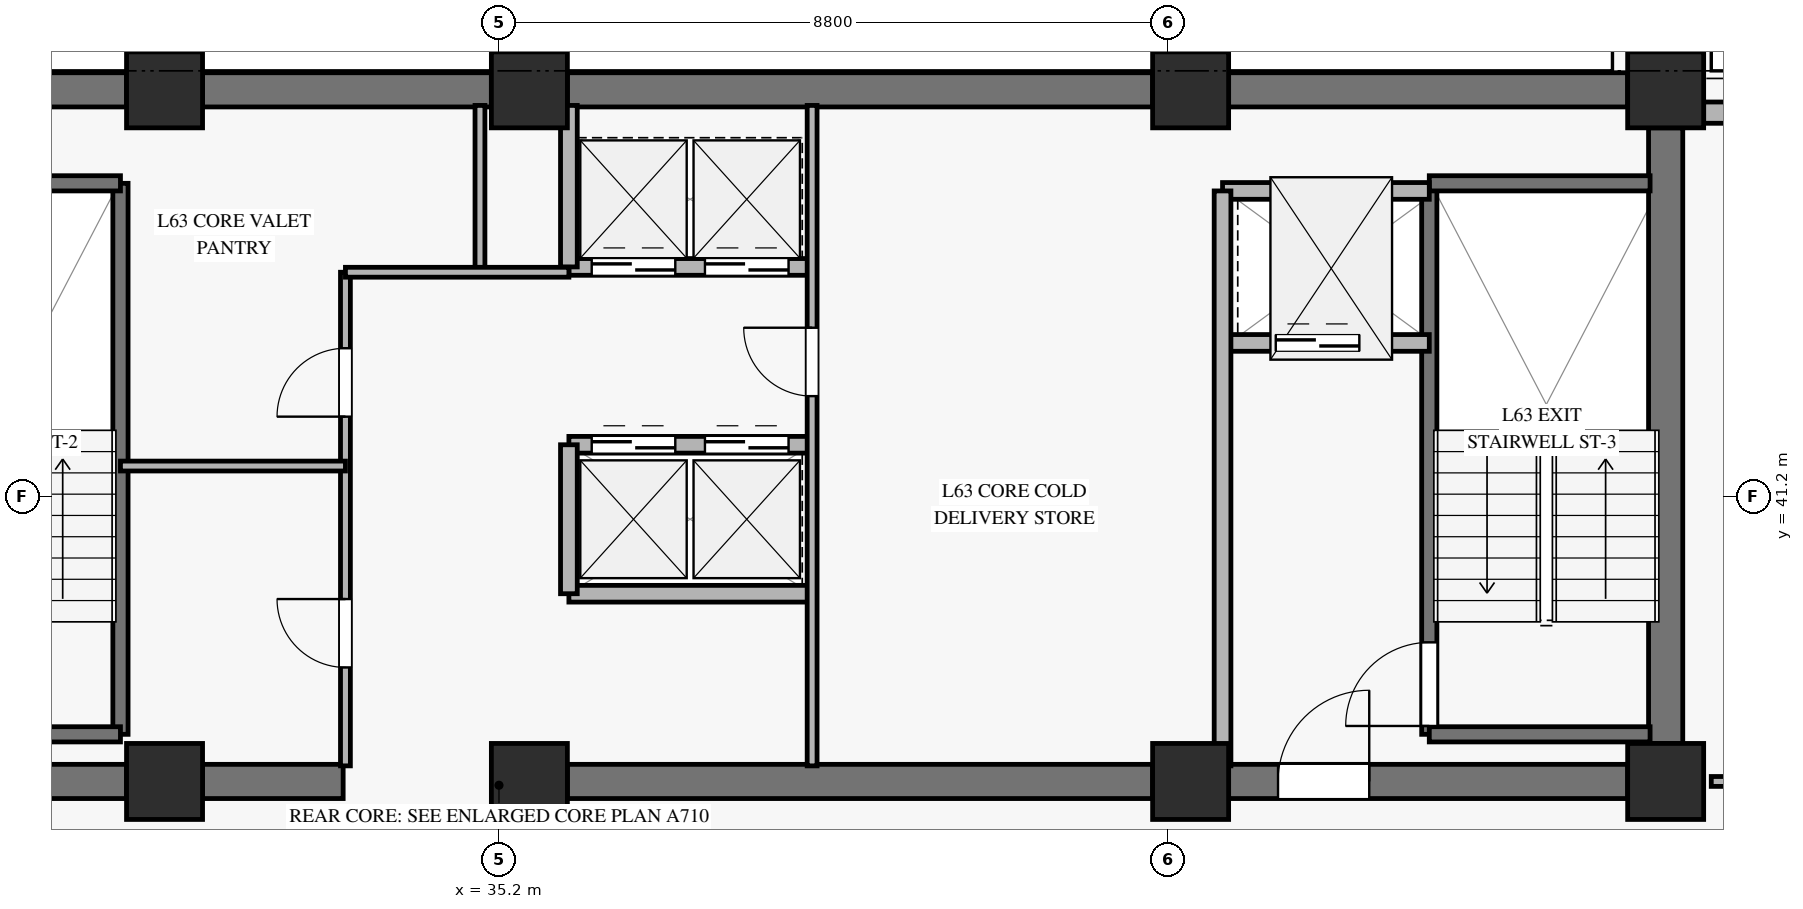
"""IFC4 building model, lengths in metres.
Left out: names, types, materials, properties, quantities, classifications, styles, units other than length and angle.
Written with IfcOpenShell. Run it as: python <this file> out.ifc"""

import sys

from ifc_helpers import new_model, si_unit, direction, frame, frame_2d, origin, origin_2d, place, context, subcontext, project, spatial, rectangle, extrude, source, transform, mapped, element, fill, save


model = new_model("IFC4")
c1 = context("Model", 3, precision=1e-05, world=origin(), true_north=direction((0.0, 1.0)))
c2 = subcontext(c1, "Body", "Model", "MODEL_VIEW")
j1 = project(units=[si_unit("LENGTHUNIT", "METRE"), si_unit("PLANEANGLEUNIT", "RADIAN")], contexts=[c1])
p1 = place(None, origin())
s1 = spatial("IfcSite", under=j1, at=p1, CompositionType="ELEMENT")
p2 = place(p1, origin())
s2 = spatial("IfcBuilding", under=s1, at=p2, CompositionType="ELEMENT")
p3 = place(p2, frame((0.0, 0.0, 248.5)))
s3 = spatial("IfcBuildingStorey", under=s2, at=p3, CompositionType="ELEMENT", Elevation=248.5)
m1 = source(origin(), c2, "Body", "SweptSolid", [
    extrude(rectangle(XDim=1.0, YDim=1.0, at=origin_2d()), origin(), (0.0, 0.0, 1.0), 3.185),
])
for number, where, z_axis, x_axis in (
    (1, (30.8, 37.45, 0.0), (0.0, 0.0, 1.0), (1.0, 0.0, 0.0)),
    (2, (30.8, 46.55, 0.0), (0.0, 0.0, 1.0), (1.0, 0.0, 0.0)),
    (3, (35.6, 37.45, 0.0), (0.0, 0.0, 1.0), (1.0, 0.0, 0.0)),
    (4, (35.6, 46.55, 0.0), (0.0, 0.0, 1.0), (1.0, 0.0, 0.0)),
    (5, (44.3, 37.45, 0.0), (0.0, 0.0, 1.0), (1.0, 0.0, 0.0)),
    (6, (44.3, 46.55, 0.0), (0.0, 0.0, 1.0), (1.0, 0.0, 0.0)),
    (7, (50.55, 37.45, 0.0), (0.0, 0.0, 1.0), (1.0, 0.0, 0.0)),
    (8, (50.55, 46.55, 0.0), (0.0, 0.0, 1.0), (1.0, 0.0, 0.0)),
):
    element("IfcColumn", number, at=place(p3, frame(where, z_axis=z_axis, x_axis=x_axis)), inside=s3, PredefinedType="PILASTER", context=c2, shape_type="MappedRepresentation", body=[
        mapped(m1, transform((0.0, 0.0, 0.0), x_axis=(1.0, 0.0, 0.0), y_axis=(0.0, 1.0, 0.0), z_axis=(0.0, 0.0, 1.0), scale=1.0)),
    ])
p4 = place(p3, frame((20.35, 46.55, 0.0), z_axis=(0.0, 0.0, 1.0), x_axis=(1.0, 0.0, 0.0)))
e9 = element("IfcWall", 9, at=p4, inside=s3, PredefinedType="SHEAR", context=c2, shape_type="SweptSolid", body=[
    extrude(rectangle(XDim=9.95, YDim=0.45, at=frame_2d((4.975, 0.0))), origin(), (0.0, 0.0, 1.0), 3.185),
])
p5 = place(p3, frame((31.3, 46.55, 0.0), z_axis=(0.0, 0.0, 1.0), x_axis=(1.0, 0.0, 0.0)))
e10 = element("IfcWall", 10, at=p5, inside=s3, PredefinedType="SHEAR", context=c2, shape_type="SweptSolid", body=[
    extrude(rectangle(XDim=3.8, YDim=0.45, at=frame_2d((1.9, 0.0))), origin(), (0.0, 0.0, 1.0), 3.185),
])
p6 = place(p3, frame((36.1, 46.55, 0.0), z_axis=(0.0, 0.0, 1.0), x_axis=(1.0, 0.0, 0.0)))
e11 = element("IfcWall", 11, at=p6, inside=s3, PredefinedType="SHEAR", context=c2, shape_type="SweptSolid", body=[
    extrude(rectangle(XDim=7.7, YDim=0.45, at=frame_2d((3.85, 0.0))), origin(), (0.0, 0.0, 1.0), 3.185),
])
p7 = place(p3, frame((44.8, 46.55, 0.0), z_axis=(0.0, 0.0, 1.0), x_axis=(1.0, 0.0, 0.0)))
e12 = element("IfcWall", 12, at=p7, inside=s3, PredefinedType="SHEAR", context=c2, shape_type="SweptSolid", body=[
    extrude(rectangle(XDim=5.25, YDim=0.45, at=frame_2d((2.625, 0.0))), origin(), (0.0, 0.0, 1.0), 3.185),
])
p8 = place(p3, frame((20.35, 37.45, 0.0), z_axis=(0.0, 0.0, 1.0), x_axis=(1.0, 0.0, 0.0)))
e13 = element("IfcWall", 13, at=p8, inside=s3, PredefinedType="SHEAR", context=c2, shape_type="SweptSolid", body=[
    extrude(rectangle(XDim=9.95, YDim=0.45, at=frame_2d((4.975, 0.0))), origin(), (0.0, 0.0, 1.0), 3.185),
])
p9 = place(p8, frame((4.2, 0.0, 0.0)))
e14 = element("IfcOpeningElement", 14, at=p9, cuts=e13, PredefinedType="OPENING", context=c2, shape_type="SweptSolid", body=[
    extrude(rectangle(XDim=1.2, YDim=2.15, at=frame_2d((0.6, 1.075))), frame((0.0, 0.235, 0.0), z_axis=(0.0, -1.0, 0.0), x_axis=(1.0, 0.0, 0.0)), (0.0, 0.0, 1.0), 0.47),
])
p10 = place(p3, frame((31.3, 37.45, 0.0), z_axis=(0.0, 0.0, 1.0), x_axis=(1.0, 0.0, 0.0)))
e15 = element("IfcWall", 15, at=p10, inside=s3, PredefinedType="SHEAR", context=c2, shape_type="SweptSolid", body=[
    extrude(rectangle(XDim=1.85, YDim=0.45, at=frame_2d((0.925, 0.0))), origin(), (0.0, 0.0, 1.0), 3.185),
])
p11 = place(p3, frame((36.1, 37.45, 0.0), z_axis=(0.0, 0.0, 1.0), x_axis=(1.0, 0.0, 0.0)))
e16 = element("IfcWall", 16, at=p11, inside=s3, PredefinedType="SHEAR", context=c2, shape_type="SweptSolid", body=[
    extrude(rectangle(XDim=7.7, YDim=0.45, at=frame_2d((3.85, 0.0))), origin(), (0.0, 0.0, 1.0), 3.185),
])
p12 = place(p3, frame((44.8, 37.45, 0.0), z_axis=(0.0, 0.0, 1.0), x_axis=(1.0, 0.0, 0.0)))
e17 = element("IfcWall", 17, at=p12, inside=s3, PredefinedType="SHEAR", context=c2, shape_type="SweptSolid", body=[
    extrude(rectangle(XDim=5.25, YDim=0.45, at=frame_2d((2.625, 0.0))), origin(), (0.0, 0.0, 1.0), 3.185),
])
p13 = place(p12, frame((0.65, 0.0, 0.0)))
e18 = element("IfcOpeningElement", 18, at=p13, cuts=e17, PredefinedType="OPENING", context=c2, shape_type="SweptSolid", body=[
    extrude(rectangle(XDim=1.2, YDim=2.15, at=frame_2d((0.6, 1.075))), frame((0.0, 0.235, 0.0), z_axis=(0.0, -1.0, 0.0), x_axis=(1.0, 0.0, 0.0)), (0.0, 0.0, 1.0), 0.47),
])
p14 = place(p3, frame((50.55, 37.95, 0.0), z_axis=(0.0, 0.0, 1.0), x_axis=(0.0, 1.0, 0.0)))
e19 = element("IfcWall", 19, at=p14, inside=s3, PredefinedType="SHEAR", context=c2, shape_type="SweptSolid", body=[
    extrude(rectangle(XDim=8.1, YDim=0.45, at=frame_2d((4.05, 0.0))), origin(), (0.0, 0.0, 1.0), 3.185),
])
p15 = place(p3, frame((51.05, 46.25, 0.0), z_axis=(0.0, 0.0, 1.0), x_axis=(1.0, 0.0, 0.0)))
e20 = element("IfcWall", 20, at=p15, inside=s3, PredefinedType="SOLIDWALL", context=c2, shape_type="SweptSolid", body=[
    extrude(rectangle(XDim=8.122, YDim=0.28, at=frame_2d((4.061, 0.0))), origin(), (0.0, 0.0, 1.0), 2.815),
])
p16 = place(p15, frame((3.261, 0.0, 0.45)))
e21 = element("IfcOpeningElement", 21, at=p16, cuts=e20, PredefinedType="OPENING", context=c2, shape_type="SweptSolid", body=[
    extrude(rectangle(XDim=1.6, YDim=2.0, at=frame_2d((0.8, 1.0))), frame((0.0, 0.15, 0.0), z_axis=(0.0, -1.0, 0.0), x_axis=(1.0, 0.0, 0.0)), (0.0, 0.0, 1.0), 0.3),
])
p17 = place(p3, frame((30.22, 38.07, 0.0), z_axis=(0.0, 0.0, 1.0), x_axis=(0.0, 1.0, 0.0)))
e22 = element("IfcWall", 22, at=p17, inside=s3, PredefinedType="SOLIDWALL", context=c2, shape_type="SweptSolid", body=[
    extrude(rectangle(XDim=7.25, YDim=0.2, at=frame_2d((3.625, 0.0))), origin(), (0.0, 0.0, 1.0), 3.4),
])
for number, where, z_axis, x_axis in (
    (23, (27.14, 45.32, 0.0), (0.0, 0.0, 1.0), (1.0, 0.0, 0.0)),
    (24, (27.14, 38.07, 0.0), (0.0, 0.0, 1.0), (1.0, 0.0, 0.0)),
):
    element("IfcWall", number, at=place(p3, frame(where, z_axis=z_axis, x_axis=x_axis)), inside=s3, PredefinedType="SOLIDWALL", context=c2, shape_type="SweptSolid", body=[
        extrude(rectangle(XDim=3.08, YDim=0.2, at=frame_2d((1.54, 0.0))), origin(), (0.0, 0.0, 1.0), 3.4),
    ])
p18 = place(p3, frame((47.44, 38.07, 0.0), z_axis=(0.0, 0.0, 1.0), x_axis=(0.0, 1.0, 0.0)))
e25 = element("IfcWall", 25, at=p18, inside=s3, PredefinedType="SOLIDWALL", context=c2, shape_type="SweptSolid", body=[
    extrude(rectangle(XDim=7.25, YDim=0.2, at=frame_2d((3.625, 0.0))), origin(), (0.0, 0.0, 1.0), 3.4),
])
p19 = place(p18, frame((0.11, 0.0, 0.0)))
e26 = element("IfcOpeningElement", 26, at=p19, cuts=e25, PredefinedType="OPENING", context=c2, shape_type="SweptSolid", body=[
    extrude(rectangle(XDim=1.1, YDim=2.15, at=frame_2d((0.55, 1.075))), frame((0.0, 0.11, 0.0), z_axis=(0.0, -1.0, 0.0), x_axis=(1.0, 0.0, 0.0)), (0.0, 0.0, 1.0), 0.22),
])
for number, where, z_axis, x_axis in (
    (27, (47.44, 45.32, 0.0), (0.0, 0.0, 1.0), (1.0, 0.0, 0.0)),
    (28, (47.44, 38.07, 0.0), (0.0, 0.0, 1.0), (1.0, 0.0, 0.0)),
):
    element("IfcWall", number, at=place(p3, frame(where, z_axis=z_axis, x_axis=x_axis)), inside=s3, PredefinedType="SOLIDWALL", context=c2, shape_type="SweptSolid", body=[
        extrude(rectangle(XDim=2.905, YDim=0.2, at=frame_2d((1.453, 0.0))), origin(), (0.0, 0.0, 1.0), 3.4),
    ])
p20 = place(p3, frame((44.72, 43.22, 0.0), z_axis=(0.0, 0.0, 1.0), x_axis=(1.0, 0.0, 0.0)))
e29 = element("IfcWall", 29, at=p20, inside=s3, PredefinedType="SOLIDWALL", context=c2, shape_type="SweptSolid", body=[
    extrude(rectangle(XDim=2.72, YDim=0.22, at=frame_2d((1.36, 0.0))), origin(), (0.0, 0.0, 1.0), 3.185),
])
p21 = place(p20, frame((0.7, 0.0, 0.0)))
e30 = element("IfcOpeningElement", 30, at=p21, cuts=e29, PredefinedType="OPENING", context=c2, shape_type="SweptSolid", body=[
    extrude(rectangle(XDim=1.1, YDim=2.2, at=frame_2d((0.55, 1.1))), frame((0.0, 0.12, 0.0), z_axis=(0.0, -1.0, 0.0), x_axis=(1.0, 0.0, 0.0)), (0.0, 0.0, 1.0), 0.24),
])
p22 = place(p3, frame((44.72, 45.22, 0.0), z_axis=(0.0, 0.0, 1.0), x_axis=(1.0, 0.0, 0.0)))
e31 = element("IfcWall", 31, at=p22, inside=s3, PredefinedType="SOLIDWALL", context=c2, shape_type="SweptSolid", body=[
    extrude(rectangle(XDim=2.72, YDim=0.22, at=frame_2d((1.36, 0.0))), origin(), (0.0, 0.0, 1.0), 3.185),
])
p23 = place(p3, frame((44.72, 37.655, 0.0), z_axis=(0.0, 0.0, 1.0), x_axis=(0.0, 1.0, 0.0)))
e32 = element("IfcWall", 32, at=p23, inside=s3, PredefinedType="SOLIDWALL", context=c2, shape_type="SweptSolid", body=[
    extrude(rectangle(XDim=7.565, YDim=0.22, at=frame_2d((3.782, 0.0))), origin(), (0.0, 0.0, 1.0), 3.185),
])
p24 = place(p3, frame((36.12, 44.22, 0.0), z_axis=(0.0, 0.0, 1.0), x_axis=(1.0, 0.0, 0.0)))
e33 = element("IfcWall", 33, at=p24, inside=s3, PredefinedType="SOLIDWALL", context=c2, shape_type="SweptSolid", body=[
    extrude(rectangle(XDim=3.2, YDim=0.22, at=frame_2d((1.6, 0.0))), origin(), (0.0, 0.0, 1.0), 3.185),
])
p25 = place(p24, frame((0.3, 0.0, 0.0)))
e34 = element("IfcOpeningElement", 34, at=p25, cuts=e33, PredefinedType="OPENING", context=c2, shape_type="SweptSolid", body=[
    extrude(rectangle(XDim=1.1, YDim=2.2, at=frame_2d((0.55, 1.1))), frame((0.0, 0.12, 0.0), z_axis=(0.0, -1.0, 0.0), x_axis=(1.0, 0.0, 0.0)), (0.0, 0.0, 1.0), 0.24),
])
p26 = place(p24, frame((1.79, 0.0, 0.0)))
e35 = element("IfcOpeningElement", 35, at=p26, cuts=e33, PredefinedType="OPENING", context=c2, shape_type="SweptSolid", body=[
    extrude(rectangle(XDim=1.1, YDim=2.2, at=frame_2d((0.55, 1.1))), frame((0.0, 0.12, 0.0), z_axis=(0.0, -1.0, 0.0), x_axis=(1.0, 0.0, 0.0)), (0.0, 0.0, 1.0), 0.24),
])
p27 = place(p3, frame((36.12, 41.88, 0.0), z_axis=(0.0, 0.0, 1.0), x_axis=(1.0, 0.0, 0.0)))
e36 = element("IfcWall", 36, at=p27, inside=s3, PredefinedType="SOLIDWALL", context=c2, shape_type="SweptSolid", body=[
    extrude(rectangle(XDim=3.2, YDim=0.22, at=frame_2d((1.6, 0.0))), origin(), (0.0, 0.0, 1.0), 3.185),
])
p28 = place(p27, frame((0.3, 0.0, 0.0)))
e37 = element("IfcOpeningElement", 37, at=p28, cuts=e36, PredefinedType="OPENING", context=c2, shape_type="SweptSolid", body=[
    extrude(rectangle(XDim=1.1, YDim=2.2, at=frame_2d((0.55, 1.1))), frame((0.0, 0.12, 0.0), z_axis=(0.0, -1.0, 0.0), x_axis=(1.0, 0.0, 0.0)), (0.0, 0.0, 1.0), 0.24),
])
p29 = place(p27, frame((1.79, 0.0, 0.0)))
e38 = element("IfcOpeningElement", 38, at=p29, cuts=e36, PredefinedType="OPENING", context=c2, shape_type="SweptSolid", body=[
    extrude(rectangle(XDim=1.1, YDim=2.2, at=frame_2d((0.55, 1.1))), frame((0.0, 0.12, 0.0), z_axis=(0.0, -1.0, 0.0), x_axis=(1.0, 0.0, 0.0)), (0.0, 0.0, 1.0), 0.24),
])
p30 = place(p3, frame((36.12, 39.92, 0.0), z_axis=(0.0, 0.0, 1.0), x_axis=(1.0, 0.0, 0.0)))
e39 = element("IfcWall", 39, at=p30, inside=s3, PredefinedType="SOLIDWALL", context=c2, shape_type="SweptSolid", body=[
    extrude(rectangle(XDim=3.2, YDim=0.22, at=frame_2d((1.6, 0.0))), origin(), (0.0, 0.0, 1.0), 3.185),
])
p31 = place(p3, frame((36.12, 39.92, 0.0), z_axis=(0.0, 0.0, 1.0), x_axis=(0.0, 1.0, 0.0)))
e40 = element("IfcWall", 40, at=p31, inside=s3, PredefinedType="SOLIDWALL", context=c2, shape_type="SweptSolid", body=[
    extrude(rectangle(XDim=1.96, YDim=0.22, at=frame_2d((0.98, 0.0))), origin(), (0.0, 0.0, 1.0), 3.185),
])
p32 = place(p3, frame((36.12, 44.22, 0.0), z_axis=(0.0, 0.0, 1.0), x_axis=(0.0, 1.0, 0.0)))
e41 = element("IfcWall", 41, at=p32, inside=s3, PredefinedType="SOLIDWALL", context=c2, shape_type="SweptSolid", body=[
    extrude(rectangle(XDim=2.125, YDim=0.22, at=frame_2d((1.062, 0.0))), origin(), (0.0, 0.0, 1.0), 3.185),
])
p33 = place(p3, frame((33.18, 37.655, 0.0), z_axis=(0.0, 0.0, 1.0), x_axis=(0.0, 1.0, 0.0)))
e42 = element("IfcWall", 42, at=p33, inside=s3, PredefinedType="PARTITIONING", context=c2, shape_type="SweptSolid", body=[
    extrude(rectangle(XDim=6.495, YDim=0.13, at=frame_2d((3.248, 0.0))), origin(), (0.0, 0.0, 1.0), 2.27),
])
p34 = place(p33, frame((1.295, 0.0, 0.0)))
e43 = element("IfcOpeningElement", 43, at=p34, cuts=e42, PredefinedType="OPENING", context=c2, shape_type="SweptSolid", body=[
    extrude(rectangle(XDim=0.9, YDim=2.1, at=frame_2d((0.45, 1.05))), frame((0.0, 0.075, 0.0), z_axis=(0.0, -1.0, 0.0), x_axis=(1.0, 0.0, 0.0)), (0.0, 0.0, 1.0), 0.15),
])
p35 = place(p33, frame((4.595, 0.0, 0.0)))
e44 = element("IfcOpeningElement", 44, at=p35, cuts=e42, PredefinedType="OPENING", context=c2, shape_type="SweptSolid", body=[
    extrude(rectangle(XDim=0.9, YDim=2.1, at=frame_2d((0.45, 1.05))), frame((0.0, 0.075, 0.0), z_axis=(0.0, -1.0, 0.0), x_axis=(1.0, 0.0, 0.0)), (0.0, 0.0, 1.0), 0.15),
])
p36 = place(p3, frame((34.95, 44.15, 0.0), z_axis=(0.0, 0.0, 1.0), x_axis=(0.0, 1.0, 0.0)))
e45 = element("IfcWall", 45, at=p36, inside=s3, PredefinedType="PARTITIONING", context=c2, shape_type="SweptSolid", body=[
    extrude(rectangle(XDim=2.195, YDim=0.13, at=frame_2d((1.098, 0.0))), origin(), (0.0, 0.0, 1.0), 3.185),
])
p37 = place(p3, frame((33.18, 44.15, 0.0), z_axis=(0.0, 0.0, 1.0), x_axis=(1.0, 0.0, 0.0)))
e46 = element("IfcWall", 46, at=p37, inside=s3, PredefinedType="PARTITIONING", context=c2, shape_type="SweptSolid", body=[
    extrude(rectangle(XDim=2.94, YDim=0.13, at=frame_2d((1.47, 0.0))), origin(), (0.0, 0.0, 1.0), 2.47),
])
p38 = place(p3, frame((39.32, 37.655, 0.0), z_axis=(0.0, 0.0, 1.0), x_axis=(0.0, 1.0, 0.0)))
e47 = element("IfcWall", 47, at=p38, inside=s3, PredefinedType="PARTITIONING", context=c2, shape_type="SweptSolid", body=[
    extrude(rectangle(XDim=8.69, YDim=0.13, at=frame_2d((4.345, 0.0))), origin(), (0.0, 0.0, 1.0), 3.185),
])
p39 = place(p38, frame((4.865, 0.0, 0.0)))
e48 = element("IfcOpeningElement", 48, at=p39, cuts=e47, PredefinedType="OPENING", context=c2, shape_type="SweptSolid", body=[
    extrude(rectangle(XDim=0.9, YDim=2.1, at=frame_2d((0.45, 1.05))), frame((0.0, 0.075, 0.0), z_axis=(0.0, -1.0, 0.0), x_axis=(1.0, 0.0, 0.0)), (0.0, 0.0, 1.0), 0.15),
])
p40 = place(p3, frame((30.22, 41.6, 0.0), z_axis=(0.0, 0.0, 1.0), x_axis=(1.0, 0.0, 0.0)))
e49 = element("IfcWall", 49, at=p40, inside=s3, PredefinedType="PARTITIONING", context=c2, shape_type="SweptSolid", body=[
    extrude(rectangle(XDim=2.96, YDim=0.13, at=frame_2d((1.48, 0.0))), origin(), (0.0, 0.0, 1.0), 2.47),
])
p41 = place(p3, frame((51.15, 37.45, 0.0), z_axis=(0.0, 0.0, 1.0), x_axis=(1.0, 0.0, 0.0)))
e50 = element("IfcWall", 50, at=p41, inside=s3, PredefinedType="PARTITIONING", context=c2, shape_type="SweptSolid", body=[
    extrude(rectangle(XDim=10.887, YDim=0.13, at=frame_2d((5.444, 0.0))), origin(), (0.0, 0.0, 1.0), 2.82),
])
p42 = place(p41, frame((0.5, 0.0, 0.0)))
e51 = element("IfcOpeningElement", 51, at=p42, cuts=e50, PredefinedType="OPENING", context=c2, shape_type="SweptSolid", body=[
    extrude(rectangle(XDim=0.9, YDim=2.1, at=frame_2d((0.45, 1.05))), frame((0.0, 0.075, 0.0), z_axis=(0.0, -1.0, 0.0), x_axis=(1.0, 0.0, 0.0)), (0.0, 0.0, 1.0), 0.15),
])
p43 = place(p41, frame((8.061, 0.0, 0.0)))
e52 = element("IfcOpeningElement", 52, at=p43, cuts=e50, PredefinedType="OPENING", context=c2, shape_type="SweptSolid", body=[
    extrude(rectangle(XDim=0.95, YDim=2.1, at=frame_2d((0.475, 1.05))), frame((0.0, 0.075, 0.0), z_axis=(0.0, -1.0, 0.0), x_axis=(1.0, 0.0, 0.0)), (0.0, 0.0, 1.0), 0.15),
])
m2 = source(origin(), c2, "Body", "SweptSolid", [
    extrude(rectangle(XDim=1.1, YDim=2.15, at=frame_2d((0.55, 1.075))), frame((0.0, 0.025, 0.0), z_axis=(0.0, -1.0, 0.0), x_axis=(1.0, 0.0, 0.0)), (0.0, 0.0, 1.0), 0.05),
])
p44 = place(p19, origin())
e53 = element("IfcDoor", 53, at=p44, inside=s3, OperationType="SINGLE_SWING_LEFT", PredefinedType="DOOR", context=c2, shape_type="MappedRepresentation", body=[
    mapped(m2, transform((0.0, 0.0, 0.0), x_axis=(1.0, 0.0, 0.0), y_axis=(0.0, 1.0, 0.0), z_axis=(0.0, 0.0, 1.0), scale=1.0)),
])
fill(e26, e53)
m3 = source(origin(), c2, "Body", "SweptSolid", [
    extrude(rectangle(XDim=1.1, YDim=2.2, at=frame_2d((0.55, 1.1))), frame((0.0, 0.025, 0.0), z_axis=(0.0, -1.0, 0.0), x_axis=(1.0, 0.0, 0.0)), (0.0, 0.0, 1.0), 0.05),
])
p45 = place(p21, origin())
e54 = element("IfcDoor", 54, at=p45, inside=s3, OperationType="SLIDING_TO_LEFT", PredefinedType="DOOR", context=c2, shape_type="MappedRepresentation", body=[
    mapped(m3, transform((0.0, 0.0, 0.0), x_axis=(1.0, 0.0, 0.0), y_axis=(0.0, 1.0, 0.0), z_axis=(0.0, 0.0, 1.0), scale=1.0)),
])
fill(e30, e54)
m4 = source(origin(), c2, "Body", "SweptSolid", [
    extrude(rectangle(XDim=1.2, YDim=2.15, at=frame_2d((0.6, 1.075))), frame((0.0, 0.025, 0.0), z_axis=(0.0, -1.0, 0.0), x_axis=(1.0, 0.0, 0.0)), (0.0, 0.0, 1.0), 0.05),
])
p46 = place(p13, origin())
e55 = element("IfcDoor", 55, at=p46, inside=s3, OperationType="SINGLE_SWING_RIGHT", PredefinedType="DOOR", context=c2, shape_type="MappedRepresentation", body=[
    mapped(m4, transform((0.0, 0.0, 0.0), x_axis=(1.0, 0.0, 0.0), y_axis=(0.0, 1.0, 0.0), z_axis=(0.0, 0.0, 1.0), scale=1.0)),
])
fill(e18, e55)
p47 = place(p25, origin())
e56 = element("IfcDoor", 56, at=p47, inside=s3, OperationType="SLIDING_TO_LEFT", PredefinedType="DOOR", context=c2, shape_type="MappedRepresentation", body=[
    mapped(m3, transform((0.0, 0.0, 0.0), x_axis=(1.0, 0.0, 0.0), y_axis=(0.0, 1.0, 0.0), z_axis=(0.0, 0.0, 1.0), scale=1.0)),
])
fill(e34, e56)
p48 = place(p26, origin())
e57 = element("IfcDoor", 57, at=p48, inside=s3, OperationType="SLIDING_TO_LEFT", PredefinedType="DOOR", context=c2, shape_type="MappedRepresentation", body=[
    mapped(m3, transform((0.0, 0.0, 0.0), x_axis=(1.0, 0.0, 0.0), y_axis=(0.0, 1.0, 0.0), z_axis=(0.0, 0.0, 1.0), scale=1.0)),
])
fill(e35, e57)
p49 = place(p28, origin())
e58 = element("IfcDoor", 58, at=p49, inside=s3, OperationType="SLIDING_TO_LEFT", PredefinedType="DOOR", context=c2, shape_type="MappedRepresentation", body=[
    mapped(m3, transform((0.0, 0.0, 0.0), x_axis=(1.0, 0.0, 0.0), y_axis=(0.0, 1.0, 0.0), z_axis=(0.0, 0.0, 1.0), scale=1.0)),
])
fill(e37, e58)
p50 = place(p29, origin())
e59 = element("IfcDoor", 59, at=p50, inside=s3, OperationType="SLIDING_TO_LEFT", PredefinedType="DOOR", context=c2, shape_type="MappedRepresentation", body=[
    mapped(m3, transform((0.0, 0.0, 0.0), x_axis=(1.0, 0.0, 0.0), y_axis=(0.0, 1.0, 0.0), z_axis=(0.0, 0.0, 1.0), scale=1.0)),
])
fill(e38, e59)
m5 = source(origin(), c2, "Body", "SweptSolid", [
    extrude(rectangle(XDim=0.9, YDim=2.1, at=frame_2d((0.45, 1.05))), frame((0.0, 0.025, 0.0), z_axis=(0.0, -1.0, 0.0), x_axis=(1.0, 0.0, 0.0)), (0.0, 0.0, 1.0), 0.05),
])
p51 = place(p34, origin())
e60 = element("IfcDoor", 60, at=p51, inside=s3, OperationType="SINGLE_SWING_RIGHT", PredefinedType="DOOR", context=c2, shape_type="MappedRepresentation", body=[
    mapped(m5, transform((0.0, 0.0, 0.0), x_axis=(1.0, 0.0, 0.0), y_axis=(0.0, 1.0, 0.0), z_axis=(0.0, 0.0, 1.0), scale=1.0)),
])
fill(e43, e60)
p52 = place(p35, origin())
e61 = element("IfcDoor", 61, at=p52, inside=s3, OperationType="SINGLE_SWING_LEFT", PredefinedType="DOOR", context=c2, shape_type="MappedRepresentation", body=[
    mapped(m5, transform((0.0, 0.0, 0.0), x_axis=(1.0, 0.0, 0.0), y_axis=(0.0, 1.0, 0.0), z_axis=(0.0, 0.0, 1.0), scale=1.0)),
])
fill(e44, e61)
p53 = place(p39, origin())
e62 = element("IfcDoor", 62, at=p53, inside=s3, OperationType="SINGLE_SWING_RIGHT", PredefinedType="DOOR", context=c2, shape_type="MappedRepresentation", body=[
    mapped(m5, transform((0.0, 0.0, 0.0), x_axis=(1.0, 0.0, 0.0), y_axis=(0.0, 1.0, 0.0), z_axis=(0.0, 0.0, 1.0), scale=1.0)),
])
fill(e48, e62)
save(model, sys.argv[1])
